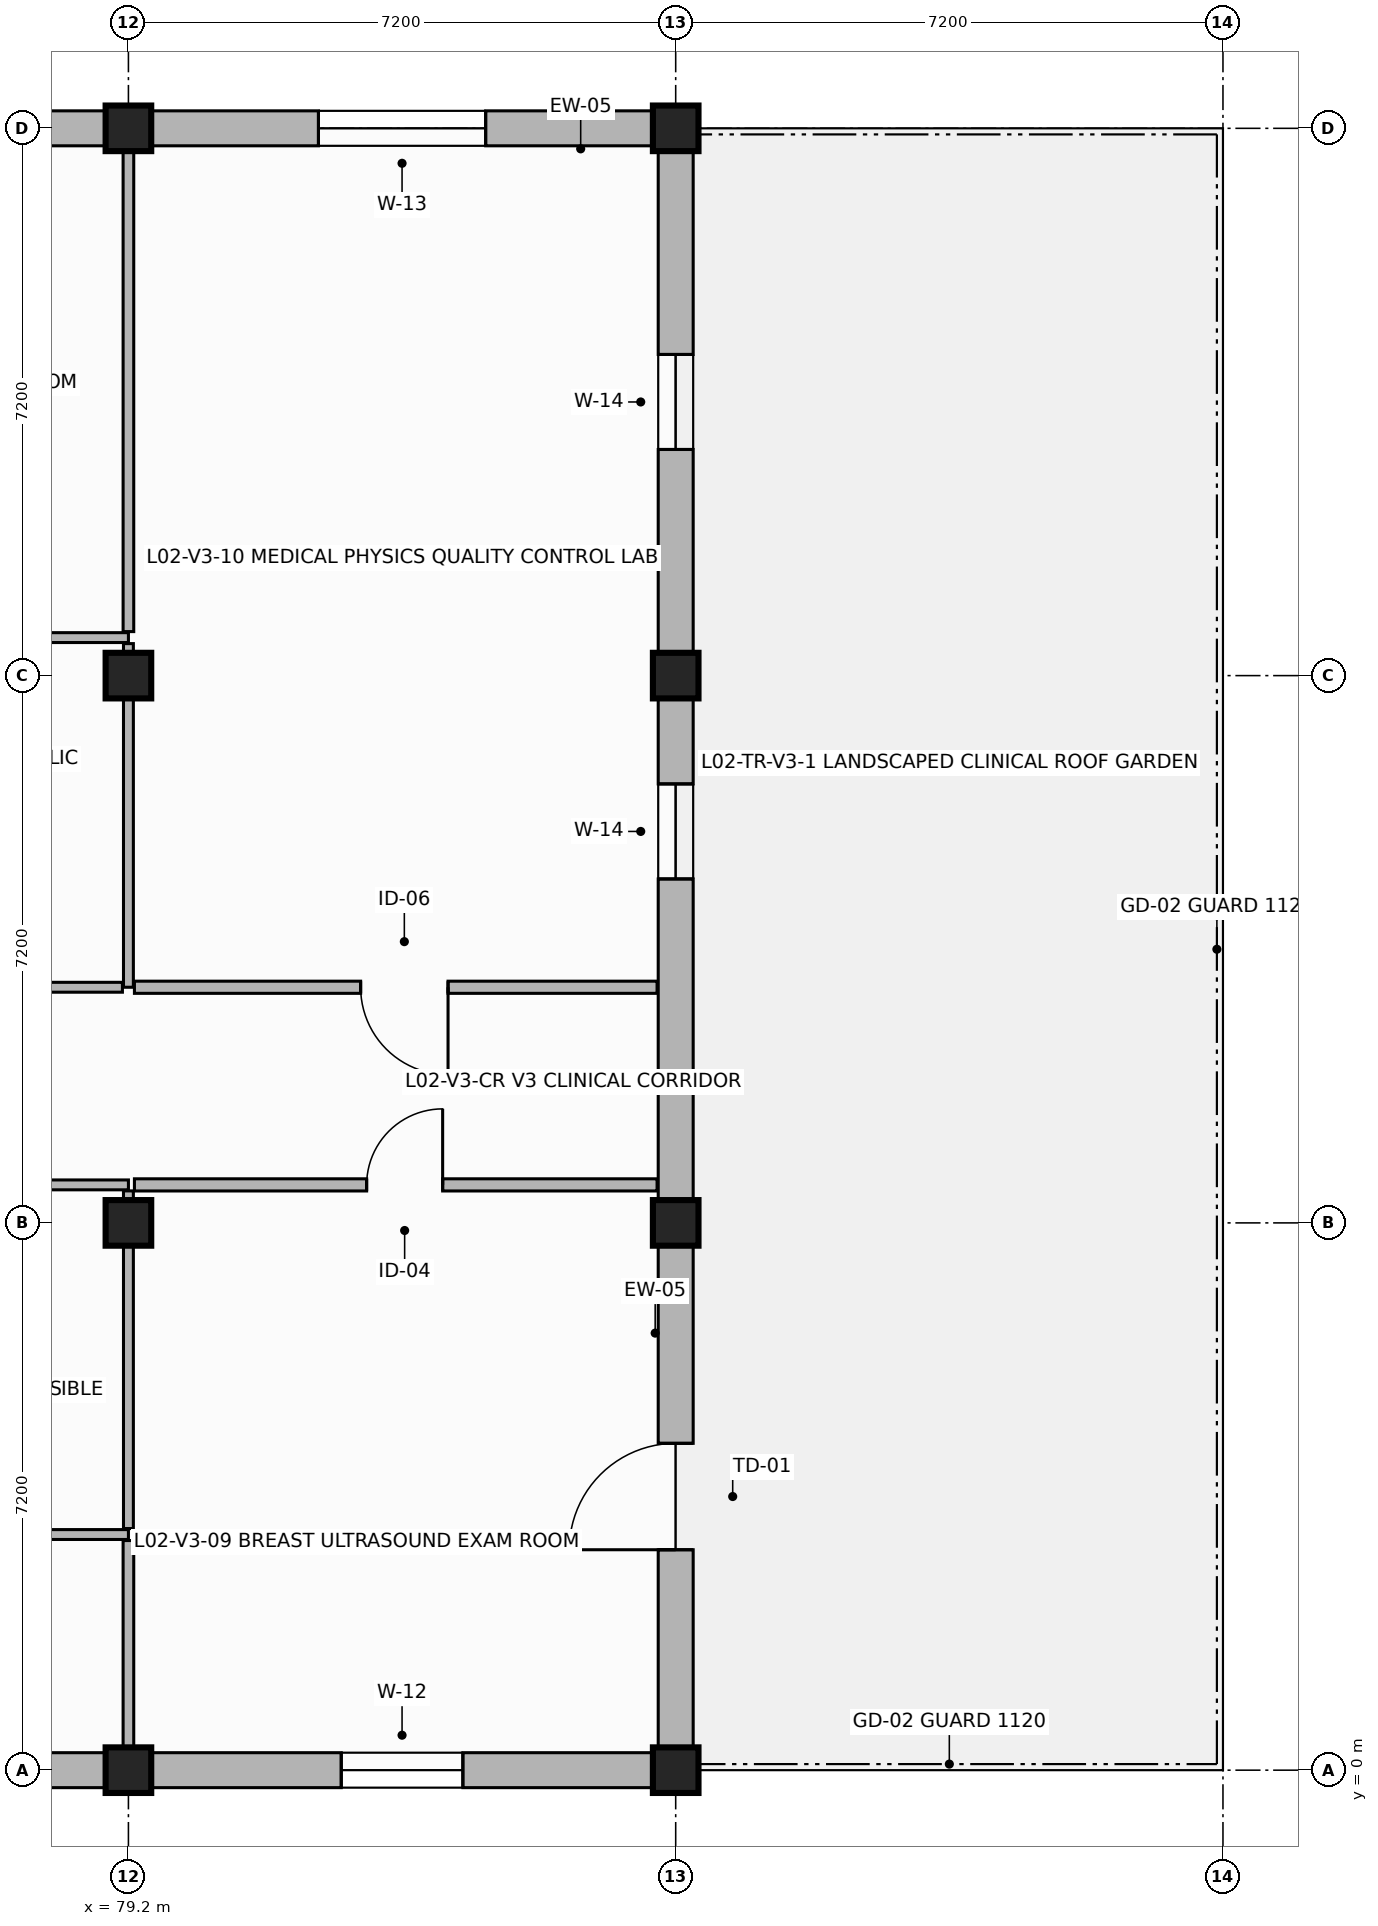
"""IFC4 building model, lengths in metres.
Left out: names, types, materials, properties, quantities, classifications, styles, units other than length and angle.
Written with IfcOpenShell. Run it as: python <this file> out.ifc"""

import sys

from ifc_helpers import new_model, si_unit, direction, frame, frame_2d, origin, origin_2d, place, context, subcontext, project, spatial, rectangle, extrude, element, fill, save


model = new_model("IFC4")
c1 = context("Model", 3, precision=1e-05, world=origin(), true_north=direction((0.0, 1.0)))
c2 = subcontext(c1, "Body", "Model", "MODEL_VIEW")
j1 = project(units=[si_unit("LENGTHUNIT", "METRE"), si_unit("PLANEANGLEUNIT", "RADIAN")], contexts=[c1])
p1 = place(None, origin())
s1 = spatial("IfcSite", under=j1, at=p1, CompositionType="ELEMENT")
p2 = place(p1, origin())
s2 = spatial("IfcBuilding", under=s1, at=p2, CompositionType="ELEMENT")
p3 = place(p2, frame((0.0, 0.0, 8.4)))
s3 = spatial("IfcBuildingStorey", under=s2, at=p3, CompositionType="ELEMENT", Elevation=8.4)
for number, where, z_axis, x_axis in (
    (1, (79.2, 0.0, 0.0), (0.0, 0.0, 1.0), (1.0, 0.0, 0.0)),
    (2, (79.2, 7.2, 0.0), (0.0, 0.0, 1.0), (1.0, 0.0, 0.0)),
    (3, (79.2, 14.4, 0.0), (0.0, 0.0, 1.0), (1.0, 0.0, 0.0)),
    (4, (79.2, 21.6, 0.0), (0.0, 0.0, 1.0), (1.0, 0.0, 0.0)),
    (5, (86.4, 0.0, 0.0), (0.0, 0.0, 1.0), (1.0, 0.0, 0.0)),
    (6, (86.4, 7.2, 0.0), (0.0, 0.0, 1.0), (1.0, 0.0, 0.0)),
    (7, (86.4, 14.4, 0.0), (0.0, 0.0, 1.0), (1.0, 0.0, 0.0)),
    (8, (86.4, 21.6, 0.0), (0.0, 0.0, 1.0), (1.0, 0.0, 0.0)),
):
    element("IfcColumn", number, at=place(p3, frame(where, z_axis=z_axis, x_axis=x_axis)), inside=s3, PredefinedType="COLUMN", context=c2, shape_type="SweptSolid", body=[
        extrude(rectangle(XDim=0.6, YDim=0.6, at=origin_2d()), origin(), (0.0, 0.0, 1.0), 3.9),
    ])
p4 = place(p3, frame((72.0, 0.0, 0.0), z_axis=(0.0, 0.0, 1.0), x_axis=(1.0, 0.0, 0.0)))
e9 = element("IfcWall", 9, at=p4, inside=s3, PredefinedType="SOLIDWALL", context=c2, shape_type="SweptSolid", body=[
    extrude(rectangle(XDim=7.2, YDim=0.46, at=frame_2d((3.6, 0.0))), origin(), (0.0, 0.0, 1.0), 3.3),
])
p5 = place(p4, frame((2.8, 0.0, 1.2)))
e10 = element("IfcOpeningElement", 10, at=p5, cuts=e9, PredefinedType="OPENING", context=c2, shape_type="SweptSolid", body=[
    extrude(rectangle(XDim=1.6, YDim=1.4, at=frame_2d((0.8, 0.7))), frame((0.0, 0.24, 0.0), z_axis=(0.0, -1.0, 0.0), x_axis=(1.0, 0.0, 0.0)), (0.0, 0.0, 1.0), 0.48),
])
p6 = place(p3, frame((79.2, 0.0, 0.0), z_axis=(0.0, 0.0, 1.0), x_axis=(1.0, 0.0, 0.0)))
e11 = element("IfcWall", 11, at=p6, inside=s3, PredefinedType="SOLIDWALL", context=c2, shape_type="SweptSolid", body=[
    extrude(rectangle(XDim=7.2, YDim=0.46, at=frame_2d((3.6, 0.0))), origin(), (0.0, 0.0, 1.0), 3.3),
])
p7 = place(p6, frame((2.8, 0.0, 1.2)))
e12 = element("IfcOpeningElement", 12, at=p7, cuts=e11, PredefinedType="OPENING", context=c2, shape_type="SweptSolid", body=[
    extrude(rectangle(XDim=1.6, YDim=1.4, at=frame_2d((0.8, 0.7))), frame((0.0, 0.24, 0.0), z_axis=(0.0, -1.0, 0.0), x_axis=(1.0, 0.0, 0.0)), (0.0, 0.0, 1.0), 0.48),
])
p8 = place(p3, frame((86.4, 0.0, 0.0), z_axis=(0.0, 0.0, 1.0), x_axis=(0.0, 1.0, 0.0)))
e13 = element("IfcWall", 13, at=p8, inside=s3, PredefinedType="SOLIDWALL", context=c2, shape_type="SweptSolid", body=[
    extrude(rectangle(XDim=7.2, YDim=0.46, at=frame_2d((3.6, 0.0))), origin(), (0.0, 0.0, 1.0), 3.3),
])
p9 = place(p8, frame((2.9, 0.0, 0.0)))
e14 = element("IfcOpeningElement", 14, at=p9, cuts=e13, PredefinedType="OPENING", context=c2, shape_type="SweptSolid", body=[
    extrude(rectangle(XDim=1.4, YDim=2.25, at=frame_2d((0.7, 1.125))), frame((0.0, 0.24, 0.0), z_axis=(0.0, -1.0, 0.0), x_axis=(1.0, 0.0, 0.0)), (0.0, 0.0, 1.0), 0.48),
])
p10 = place(p3, frame((86.4, 7.2, 0.0), z_axis=(0.0, 0.0, 1.0), x_axis=(0.0, 1.0, 0.0)))
e15 = element("IfcWall", 15, at=p10, inside=s3, PredefinedType="SOLIDWALL", context=c2, shape_type="SweptSolid", body=[
    extrude(rectangle(XDim=7.2, YDim=0.46, at=frame_2d((3.6, 0.0))), origin(), (0.0, 0.0, 1.0), 3.3),
])
p11 = place(p10, frame((4.525, 0.0, 1.2)))
e16 = element("IfcOpeningElement", 16, at=p11, cuts=e15, PredefinedType="OPENING", context=c2, shape_type="SweptSolid", body=[
    extrude(rectangle(XDim=1.25, YDim=1.35, at=frame_2d((0.625, 0.675))), frame((0.0, 0.24, 0.0), z_axis=(0.0, -1.0, 0.0), x_axis=(1.0, 0.0, 0.0)), (0.0, 0.0, 1.0), 0.48),
])
p12 = place(p3, frame((86.4, 14.4, 0.0), z_axis=(0.0, 0.0, 1.0), x_axis=(0.0, 1.0, 0.0)))
e17 = element("IfcWall", 17, at=p12, inside=s3, PredefinedType="SOLIDWALL", context=c2, shape_type="SweptSolid", body=[
    extrude(rectangle(XDim=7.2, YDim=0.46, at=frame_2d((3.6, 0.0))), origin(), (0.0, 0.0, 1.0), 3.3),
])
p13 = place(p12, frame((2.975, 0.0, 1.2)))
e18 = element("IfcOpeningElement", 18, at=p13, cuts=e17, PredefinedType="OPENING", context=c2, shape_type="SweptSolid", body=[
    extrude(rectangle(XDim=1.25, YDim=1.35, at=frame_2d((0.625, 0.675))), frame((0.0, 0.24, 0.0), z_axis=(0.0, -1.0, 0.0), x_axis=(1.0, 0.0, 0.0)), (0.0, 0.0, 1.0), 0.48),
])
p14 = place(p3, frame((86.4, 21.6, 0.0), z_axis=(0.0, 0.0, 1.0), x_axis=(-1.0, 0.0, 0.0)))
e19 = element("IfcWall", 19, at=p14, inside=s3, PredefinedType="SOLIDWALL", context=c2, shape_type="SweptSolid", body=[
    extrude(rectangle(XDim=7.2, YDim=0.46, at=frame_2d((3.6, 0.0))), origin(), (0.0, 0.0, 1.0), 3.3),
])
p15 = place(p14, frame((2.5, 0.0, 1.2)))
e20 = element("IfcOpeningElement", 20, at=p15, cuts=e19, PredefinedType="OPENING", context=c2, shape_type="SweptSolid", body=[
    extrude(rectangle(XDim=2.2, YDim=1.1, at=frame_2d((1.1, 0.55))), frame((0.0, 0.24, 0.0), z_axis=(0.0, -1.0, 0.0), x_axis=(1.0, 0.0, 0.0)), (0.0, 0.0, 1.0), 0.48),
])
p16 = place(p3, frame((79.2, 21.6, 0.0), z_axis=(0.0, 0.0, 1.0), x_axis=(-1.0, 0.0, 0.0)))
e21 = element("IfcWall", 21, at=p16, inside=s3, PredefinedType="SOLIDWALL", context=c2, shape_type="SweptSolid", body=[
    extrude(rectangle(XDim=7.2, YDim=0.46, at=frame_2d((3.6, 0.0))), origin(), (0.0, 0.0, 1.0), 3.3),
])
p17 = place(p16, frame((2.5, 0.0, 1.2)))
e22 = element("IfcOpeningElement", 22, at=p17, cuts=e21, PredefinedType="OPENING", context=c2, shape_type="SweptSolid", body=[
    extrude(rectangle(XDim=2.2, YDim=1.1, at=frame_2d((1.1, 0.55))), frame((0.0, 0.24, 0.0), z_axis=(0.0, -1.0, 0.0), x_axis=(1.0, 0.0, 0.0)), (0.0, 0.0, 1.0), 0.48),
])
p18 = place(p3, frame((79.2, 3.1, 0.0), z_axis=(0.0, 0.0, 1.0), x_axis=(-1.0, 0.0, 0.0)))
e23 = element("IfcWall", 23, at=p18, inside=s3, PredefinedType="PARTITIONING", context=c2, shape_type="SweptSolid", body=[
    extrude(rectangle(XDim=3.6, YDim=0.13, at=frame_2d((1.8, 0.0))), origin(), (0.0, 0.0, 1.0), 3.04),
])
p19 = place(p3, frame((75.679, 7.7, 0.0), z_axis=(0.0, 0.0, 1.0), x_axis=(1.0, 0.0, 0.0)))
e24 = element("IfcWall", 24, at=p19, inside=s3, PredefinedType="PARTITIONING", context=c2, shape_type="SweptSolid", body=[
    extrude(rectangle(XDim=3.521, YDim=0.13, at=frame_2d((1.76, 0.0))), origin(), (0.0, 0.0, 1.0), 3.04),
])
p20 = place(p19, frame((0.48, 0.0, 0.0)))
e25 = element("IfcOpeningElement", 25, at=p20, cuts=e24, PredefinedType="OPENING", context=c2, shape_type="SweptSolid", body=[
    extrude(rectangle(XDim=0.95, YDim=2.1, at=frame_2d((0.475, 1.05))), frame((0.0, 0.075, 0.0), z_axis=(0.0, -1.0, 0.0), x_axis=(1.0, 0.0, 0.0)), (0.0, 0.0, 1.0), 0.15),
])
p21 = place(p3, frame((79.2, 7.621, 0.0), z_axis=(0.0, 0.0, 1.0), x_axis=(0.0, -1.0, 0.0)))
e26 = element("IfcWall", 26, at=p21, inside=s3, PredefinedType="PARTITIONING", context=c2, shape_type="SweptSolid", body=[
    extrude(rectangle(XDim=4.442, YDim=0.13, at=frame_2d((2.221, 0.0))), origin(), (0.0, 0.0, 1.0), 3.04),
])
p22 = place(p3, frame((79.2, 3.021, 0.0), z_axis=(0.0, 0.0, 1.0), x_axis=(0.0, -1.0, 0.0)))
e27 = element("IfcWall", 27, at=p22, inside=s3, PredefinedType="PARTITIONING", context=c2, shape_type="SweptSolid", body=[
    extrude(rectangle(XDim=2.776, YDim=0.14, at=frame_2d((1.388, 0.0))), origin(), (0.0, 0.0, 1.0), 3.04),
])
p23 = place(p3, frame((75.679, 14.9, 0.0), z_axis=(0.0, 0.0, 1.0), x_axis=(1.0, 0.0, 0.0)))
e28 = element("IfcWall", 28, at=p23, inside=s3, PredefinedType="PARTITIONING", context=c2, shape_type="SweptSolid", body=[
    extrude(rectangle(XDim=3.521, YDim=0.13, at=frame_2d((1.76, 0.0))), origin(), (0.0, 0.0, 1.0), 3.04),
])
p24 = place(p3, frame((79.2, 14.821, 0.0), z_axis=(0.0, 0.0, 1.0), x_axis=(0.0, -1.0, 0.0)))
e29 = element("IfcWall", 29, at=p24, inside=s3, PredefinedType="PARTITIONING", context=c2, shape_type="SweptSolid", body=[
    extrude(rectangle(XDim=4.521, YDim=0.13, at=frame_2d((2.26, 0.0))), origin(), (0.0, 0.0, 1.0), 3.04),
])
p25 = place(p3, frame((79.121, 10.3, 0.0), z_axis=(0.0, 0.0, 1.0), x_axis=(-1.0, 0.0, 0.0)))
e30 = element("IfcWall", 30, at=p25, inside=s3, PredefinedType="PARTITIONING", context=c2, shape_type="SweptSolid", body=[
    extrude(rectangle(XDim=3.442, YDim=0.13, at=frame_2d((1.721, 0.0))), origin(), (0.0, 0.0, 1.0), 3.04),
])
p26 = place(p25, frame((2.062, 0.0, 0.0)))
e31 = element("IfcOpeningElement", 31, at=p26, cuts=e30, PredefinedType="OPENING", context=c2, shape_type="SweptSolid", body=[
    extrude(rectangle(XDim=0.9, YDim=2.1, at=frame_2d((0.45, 1.05))), frame((0.0, 0.075, 0.0), z_axis=(0.0, -1.0, 0.0), x_axis=(1.0, 0.0, 0.0)), (0.0, 0.0, 1.0), 0.15),
])
p27 = place(p3, frame((79.2, 21.355, 0.0), z_axis=(0.0, 0.0, 1.0), x_axis=(0.0, -1.0, 0.0)))
e32 = element("IfcWall", 32, at=p27, inside=s3, PredefinedType="PARTITIONING", context=c2, shape_type="SweptSolid", body=[
    extrude(rectangle(XDim=6.376, YDim=0.14, at=frame_2d((3.188, 0.0))), origin(), (0.0, 0.0, 1.0), 3.04),
])
p28 = place(p3, frame((79.279, 7.7, 0.0), z_axis=(0.0, 0.0, 1.0), x_axis=(1.0, 0.0, 0.0)))
e33 = element("IfcWall", 33, at=p28, inside=s3, PredefinedType="PARTITIONING", context=c2, shape_type="SweptSolid", body=[
    extrude(rectangle(XDim=6.876, YDim=0.16, at=frame_2d((3.438, 0.0))), origin(), (0.0, 0.0, 1.0), 3.04),
])
p29 = place(p28, frame((3.055, 0.0, 0.0)))
e34 = element("IfcOpeningElement", 34, at=p29, cuts=e33, PredefinedType="OPENING", context=c2, shape_type="SweptSolid", body=[
    extrude(rectangle(XDim=1.0, YDim=2.15, at=frame_2d((0.5, 1.075))), frame((0.0, 0.09, 0.0), z_axis=(0.0, -1.0, 0.0), x_axis=(1.0, 0.0, 0.0)), (0.0, 0.0, 1.0), 0.18),
])
p30 = place(p3, frame((86.155, 10.3, 0.0), z_axis=(0.0, 0.0, 1.0), x_axis=(-1.0, 0.0, 0.0)))
e35 = element("IfcWall", 35, at=p30, inside=s3, PredefinedType="PARTITIONING", context=c2, shape_type="SweptSolid", body=[
    extrude(rectangle(XDim=6.876, YDim=0.16, at=frame_2d((3.438, 0.0))), origin(), (0.0, 0.0, 1.0), 3.04),
])
p31 = place(p30, frame((2.75, 0.0, 0.0)))
e36 = element("IfcOpeningElement", 36, at=p31, cuts=e35, PredefinedType="OPENING", context=c2, shape_type="SweptSolid", body=[
    extrude(rectangle(XDim=1.15, YDim=2.25, at=frame_2d((0.575, 1.125))), frame((0.0, 0.09, 0.0), z_axis=(0.0, -1.0, 0.0), x_axis=(1.0, 0.0, 0.0)), (0.0, 0.0, 1.0), 0.18),
])
p32 = place(p7, origin())
e37 = element("IfcWindow", 37, at=p32, inside=s3, PartitioningType="SINGLE_PANEL", PredefinedType="WINDOW", context=c2, shape_type="SweptSolid", body=[
    extrude(rectangle(XDim=1.6, YDim=1.4, at=frame_2d((0.8, 0.7))), frame((0.0, 0.03, 0.0), z_axis=(0.0, -1.0, 0.0), x_axis=(1.0, 0.0, 0.0)), (0.0, 0.0, 1.0), 0.06),
])
fill(e12, e37)
p33 = place(p9, origin())
e38 = element("IfcDoor", 38, at=p33, inside=s3, OperationType="SINGLE_SWING_LEFT", PredefinedType="DOOR", context=c2, shape_type="SweptSolid", body=[
    extrude(rectangle(XDim=1.4, YDim=2.25, at=frame_2d((0.7, 1.125))), frame((0.0, 0.025, 0.0), z_axis=(0.0, -1.0, 0.0), x_axis=(1.0, 0.0, 0.0)), (0.0, 0.0, 1.0), 0.05),
])
fill(e14, e38)
p34 = place(p11, origin())
e39 = element("IfcWindow", 39, at=p34, inside=s3, PartitioningType="SINGLE_PANEL", PredefinedType="WINDOW", context=c2, shape_type="SweptSolid", body=[
    extrude(rectangle(XDim=1.25, YDim=1.35, at=frame_2d((0.625, 0.675))), frame((0.0, 0.03, 0.0), z_axis=(0.0, -1.0, 0.0), x_axis=(1.0, 0.0, 0.0)), (0.0, 0.0, 1.0), 0.06),
])
fill(e16, e39)
p35 = place(p13, origin())
e40 = element("IfcWindow", 40, at=p35, inside=s3, PartitioningType="SINGLE_PANEL", PredefinedType="WINDOW", context=c2, shape_type="SweptSolid", body=[
    extrude(rectangle(XDim=1.25, YDim=1.35, at=frame_2d((0.625, 0.675))), frame((0.0, 0.03, 0.0), z_axis=(0.0, -1.0, 0.0), x_axis=(1.0, 0.0, 0.0)), (0.0, 0.0, 1.0), 0.06),
])
fill(e18, e40)
p36 = place(p15, origin())
e41 = element("IfcWindow", 41, at=p36, inside=s3, PartitioningType="SINGLE_PANEL", PredefinedType="WINDOW", context=c2, shape_type="SweptSolid", body=[
    extrude(rectangle(XDim=2.2, YDim=1.1, at=frame_2d((1.1, 0.55))), frame((0.0, 0.03, 0.0), z_axis=(0.0, -1.0, 0.0), x_axis=(1.0, 0.0, 0.0)), (0.0, 0.0, 1.0), 0.06),
])
fill(e20, e41)
p37 = place(p29, origin())
e42 = element("IfcDoor", 42, at=p37, inside=s3, OperationType="SINGLE_SWING_RIGHT", PredefinedType="DOOR", context=c2, shape_type="SweptSolid", body=[
    extrude(rectangle(XDim=1.0, YDim=2.15, at=frame_2d((0.5, 1.075))), frame((0.0, 0.025, 0.0), z_axis=(0.0, -1.0, 0.0), x_axis=(1.0, 0.0, 0.0)), (0.0, 0.0, 1.0), 0.05),
])
fill(e34, e42)
p38 = place(p31, origin())
e43 = element("IfcDoor", 43, at=p38, inside=s3, OperationType="SINGLE_SWING_LEFT", PredefinedType="DOOR", context=c2, shape_type="SweptSolid", body=[
    extrude(rectangle(XDim=1.15, YDim=2.25, at=frame_2d((0.575, 1.125))), frame((0.0, 0.025, 0.0), z_axis=(0.0, -1.0, 0.0), x_axis=(1.0, 0.0, 0.0)), (0.0, 0.0, 1.0), 0.05),
])
fill(e36, e43)
save(model, sys.argv[1])
